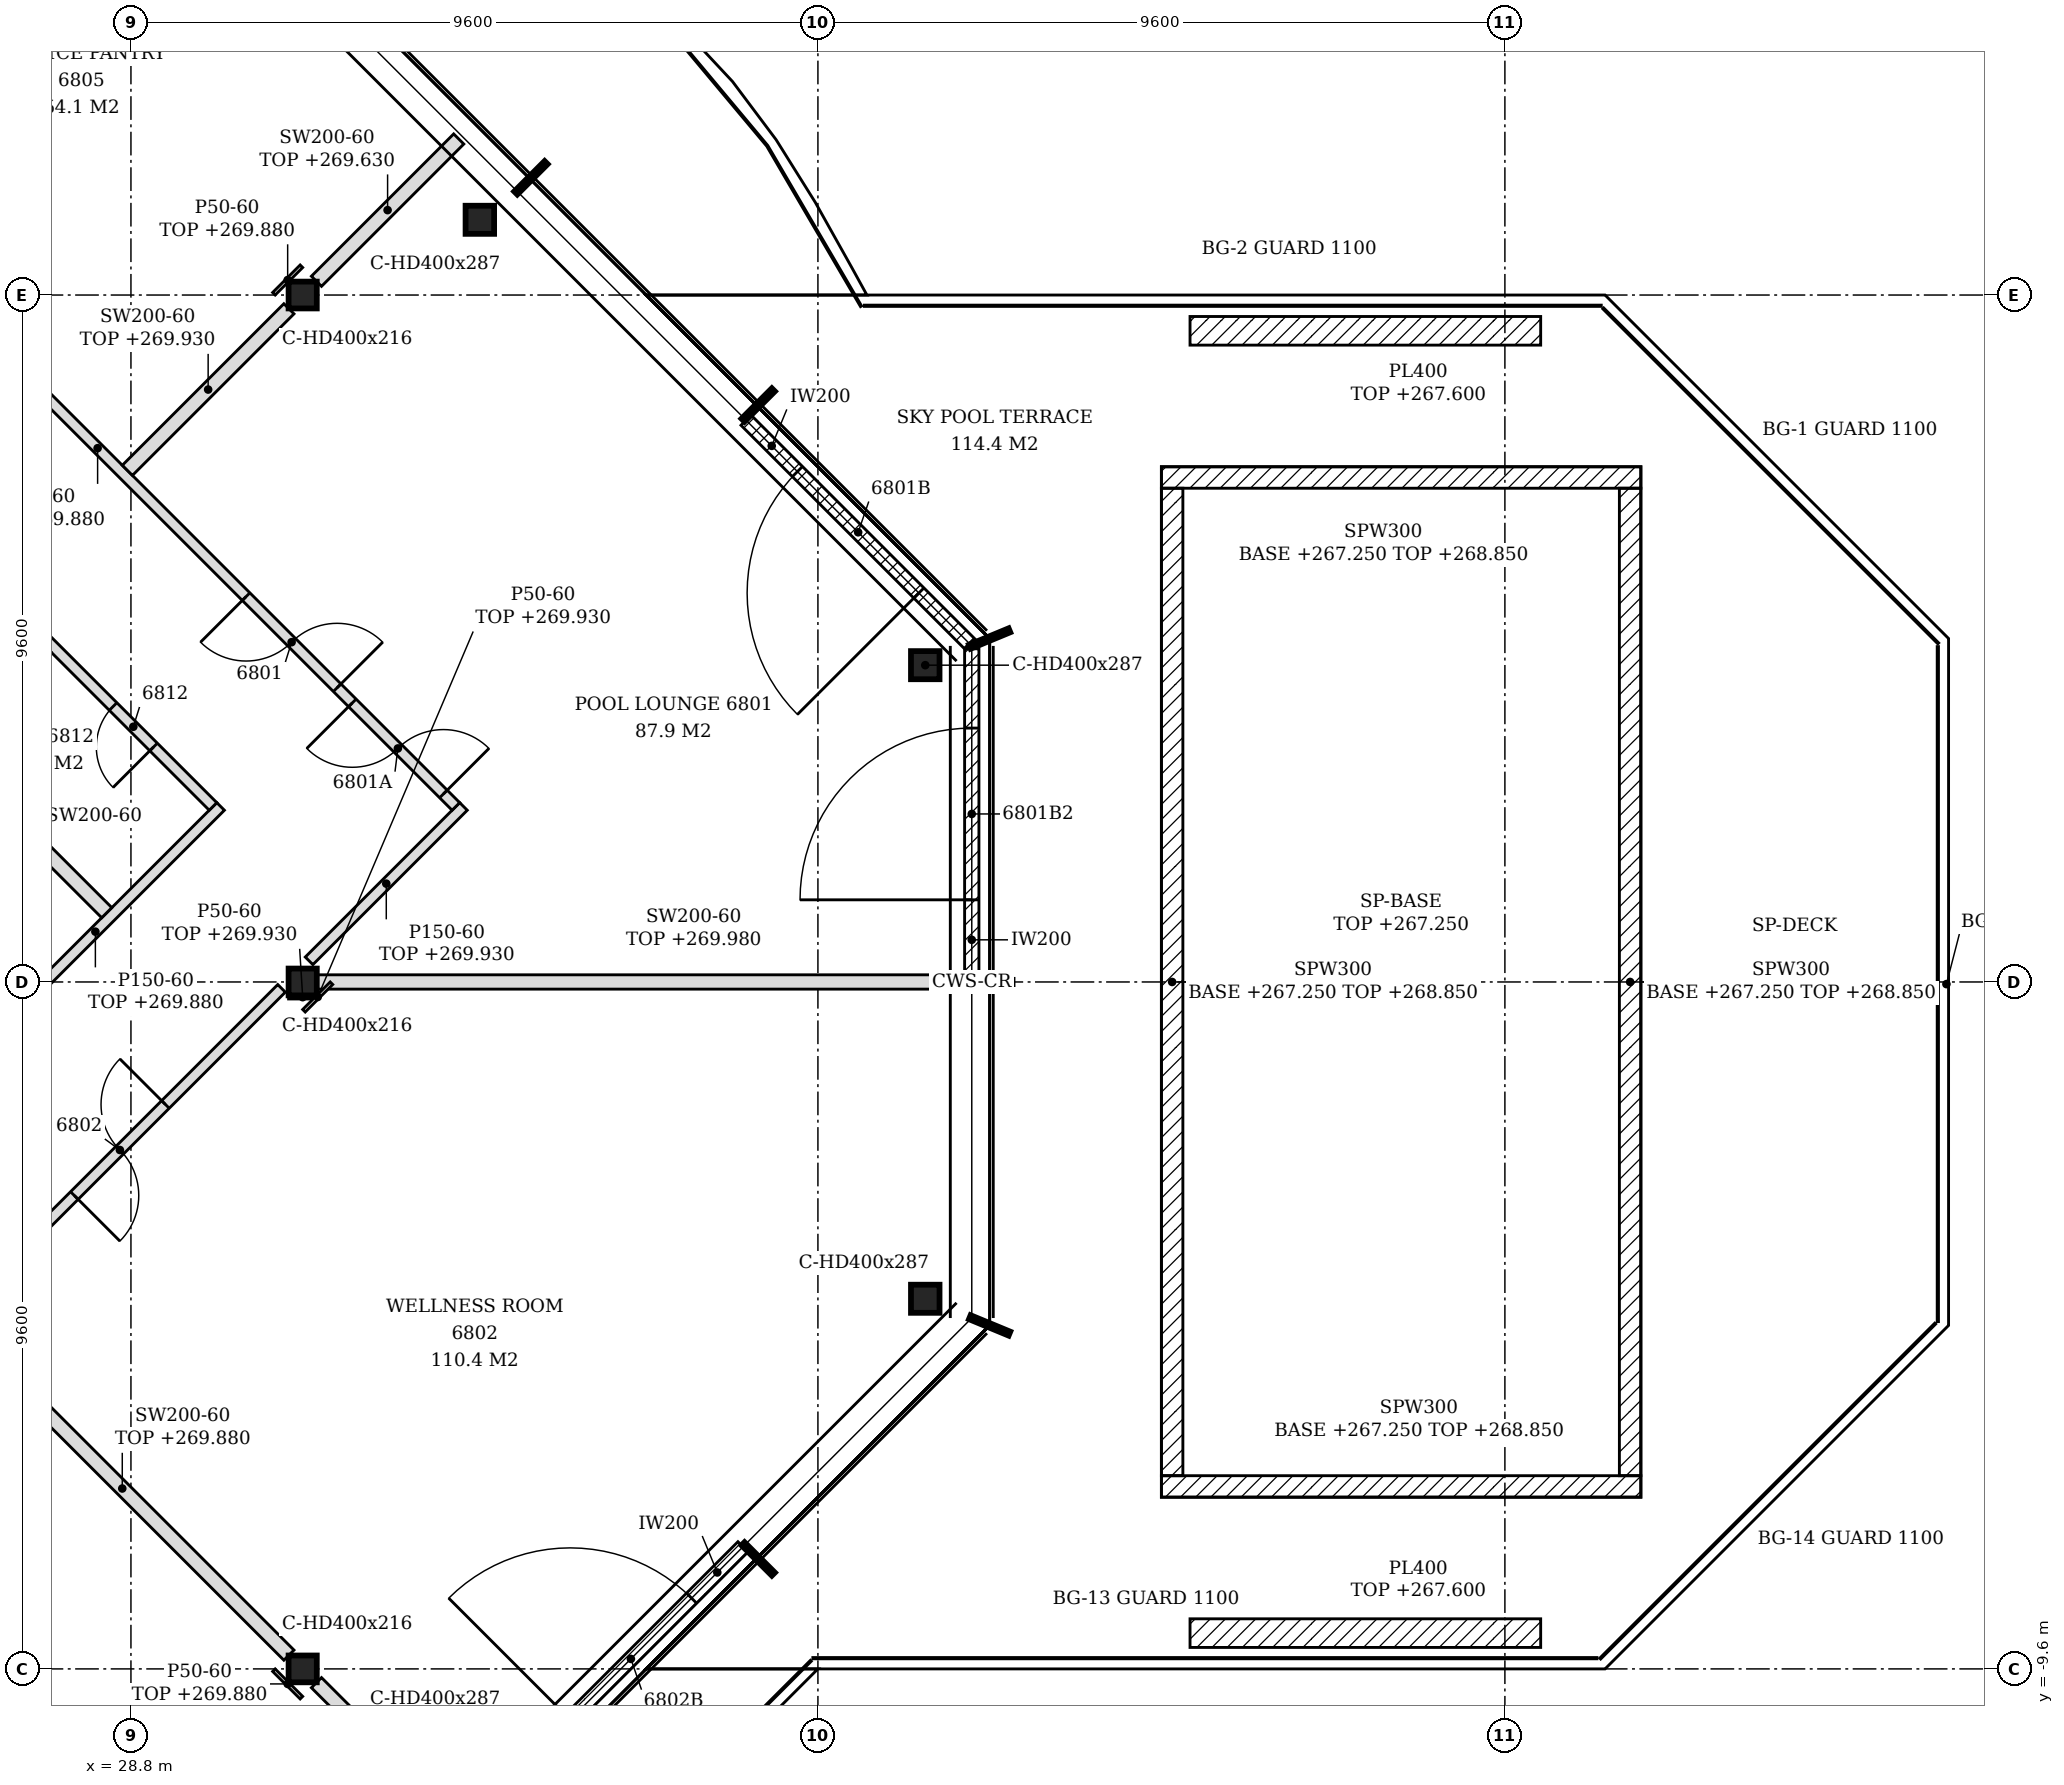
"""IFC4 building model, lengths in metres.
Left out: names, types, materials, properties, quantities, classifications, styles, units other than length and angle.
Written with IfcOpenShell. Run it as: python <this file> out.ifc"""

import sys

from ifc_helpers import new_model, si_unit, direction, frame, frame_2d, origin, origin_2d, place, context, subcontext, project, spatial, polyline, rectangle, i_section, outline, extrude, element, fill, save


model = new_model("IFC4")
c1 = context("Model", 3, precision=1e-05, world=origin(), true_north=direction((0.0, 1.0)))
c2 = subcontext(c1, "Body", "Model", "MODEL_VIEW")
j1 = project(units=[si_unit("LENGTHUNIT", "METRE"), si_unit("PLANEANGLEUNIT", "RADIAN")], contexts=[c1])
p1 = place(None, origin())
s1 = spatial("IfcSite", under=j1, at=p1, CompositionType="ELEMENT")
p2 = place(p1, origin())
s2 = spatial("IfcBuilding", under=s1, at=p2, CompositionType="ELEMENT")
p3 = place(p2, frame((0.0, 0.0, 267.0)))
s3 = spatial("IfcBuildingStorey", under=s2, at=p3, CompositionType="ELEMENT", Elevation=267.0)
for number, where, z_axis, x_axis in (
    (1, (39.9, -4.427, -0.15), (0.0, 0.0, 1.0), (1.0, 0.0, 0.0)),
    (2, (39.9, 4.427, -0.15), (0.0, 0.0, 1.0), (1.0, 0.0, 0.0)),
    (3, (33.676, 10.652, -0.15), (0.0, 0.0, 1.0), (1.0, 0.0, 0.0)),
):
    element("IfcColumn", number, at=place(p3, frame(where, z_axis=z_axis, x_axis=x_axis)), inside=s3, PredefinedType="COLUMN", context=c2, shape_type="SweptSolid", body=[
        extrude(i_section(OverallWidth=0.399, OverallDepth=0.393, WebThickness=0.023, FlangeThickness=0.037, FilletRadius=0.015, at=origin_2d()), origin(), (0.0, 0.0, 1.0), 3.6),
    ])
for number, where, z_axis, x_axis in (
    (4, (31.2, -9.6, -0.15), (0.0, 0.0, 1.0), (1.0, 0.0, 0.0)),
    (5, (31.2, 0.0, -0.15), (0.0, 0.0, 1.0), (1.0, 0.0, 0.0)),
    (6, (31.2, 9.6, -0.15), (0.0, 0.0, 1.0), (1.0, 0.0, 0.0)),
):
    element("IfcColumn", number, at=place(p3, frame(where, z_axis=z_axis, x_axis=x_axis)), inside=s3, PredefinedType="COLUMN", context=c2, shape_type="SweptSolid", body=[
        extrude(i_section(OverallWidth=0.394, OverallDepth=0.375, WebThickness=0.017, FlangeThickness=0.028, FilletRadius=0.015, at=origin_2d()), origin(), (0.0, 0.0, 1.0), 3.6),
    ])
p4 = place(p3, frame((34.22, -11.026, 0.0), z_axis=(0.0, 0.0, 1.0), x_axis=(0.707134329907, 0.707079231393, 0.0)))
e7 = element("IfcWall", 7, at=p4, inside=s3, PredefinedType="NOTDEFINED", context=c2, shape_type="SweptSolid", body=[
    extrude(rectangle(XDim=4.431, YDim=0.2, at=frame_2d((2.215, 0.0))), origin(), (0.0, 0.0, 1.0), 3.45),
])
p5 = place(p4, frame((1.015, 0.0, 0.0)))
e8 = element("IfcOpeningElement", 8, at=p5, cuts=e7, PredefinedType="OPENING", context=c2, shape_type="SweptSolid", body=[
    extrude(rectangle(XDim=2.4, YDim=2.4, at=frame_2d((1.2, 1.2))), frame((0.0, 0.11, 0.0), z_axis=(0.0, -1.0, 0.0), x_axis=(1.0, 0.0, 0.0)), (0.0, 0.0, 1.0), 0.22),
])
p6 = place(p3, frame((40.55, 0.03, 0.0), z_axis=(0.0, 0.0, 1.0), x_axis=(0.0, 1.0, 0.0)))
e9 = element("IfcWall", 9, at=p6, inside=s3, PredefinedType="NOTDEFINED", context=c2, shape_type="SweptSolid", body=[
    extrude(rectangle(XDim=4.626, YDim=0.2, at=frame_2d((2.313, 0.0))), origin(), (0.0, 0.0, 1.0), 3.45),
])
p7 = place(p6, frame((1.118, 0.0, 0.0)))
e10 = element("IfcOpeningElement", 10, at=p7, cuts=e9, PredefinedType="OPENING", context=c2, shape_type="SweptSolid", body=[
    extrude(rectangle(XDim=2.4, YDim=2.4, at=frame_2d((1.2, 1.2))), frame((0.0, 0.11, 0.0), z_axis=(0.0, -1.0, 0.0), x_axis=(1.0, 0.0, 0.0)), (0.0, 0.0, 1.0), 0.22),
])
p8 = place(p3, frame((40.522, 4.725, 0.0), z_axis=(0.0, 0.0, 1.0), x_axis=(-0.707106781187, 0.707106781187, 0.0)))
e11 = element("IfcWall", 11, at=p8, inside=s3, PredefinedType="NOTDEFINED", context=c2, shape_type="SweptSolid", body=[
    extrude(rectangle(XDim=4.421, YDim=0.2, at=frame_2d((2.21, 0.0))), origin(), (0.0, 0.0, 1.0), 3.45),
])
p9 = place(p8, frame((1.005, 0.0, 0.0)))
e12 = element("IfcOpeningElement", 12, at=p9, cuts=e11, PredefinedType="OPENING", context=c2, shape_type="SweptSolid", body=[
    extrude(rectangle(XDim=2.4, YDim=2.4, at=frame_2d((1.2, 1.2))), frame((0.0, 0.11, 0.0), z_axis=(0.0, -1.0, 0.0), x_axis=(1.0, 0.0, 0.0)), (0.0, 0.0, 1.0), 0.22),
])
for number, where, z_axis, x_axis in (
    (13, (43.2, -7.05, 0.25), (0.0, 0.0, 1.0), (1.0, 0.0, 0.0)),
    (14, (43.2, 7.05, 0.25), (0.0, 0.0, 1.0), (1.0, 0.0, 0.0)),
):
    element("IfcWall", number, at=place(p3, frame(where, z_axis=z_axis, x_axis=x_axis)), inside=s3, PredefinedType="NOTDEFINED", context=c2, shape_type="SweptSolid", body=[
        extrude(rectangle(XDim=6.7, YDim=0.3, at=frame_2d((3.35, 0.0))), origin(), (0.0, 0.0, 1.0), 1.6),
    ])
for number, where, z_axis, x_axis in (
    (15, (43.35, -6.9, 0.25), (0.0, 0.0, 1.0), (0.0, 1.0, 0.0)),
    (16, (49.75, -6.9, 0.25), (0.0, 0.0, 1.0), (0.0, 1.0, 0.0)),
):
    element("IfcWall", number, at=place(p3, frame(where, z_axis=z_axis, x_axis=x_axis)), inside=s3, PredefinedType="NOTDEFINED", context=c2, shape_type="SweptSolid", body=[
        extrude(rectangle(XDim=13.8, YDim=0.3, at=frame_2d((6.9, 0.0))), origin(), (0.0, 0.0, 1.0), 1.6),
    ])
for number, where, z_axis, x_axis in (
    (17, (43.6, -9.1, 0.0), (0.0, 0.0, 1.0), (1.0, 0.0, 0.0)),
    (18, (43.6, 9.1, 0.0), (0.0, 0.0, 1.0), (1.0, 0.0, 0.0)),
):
    element("IfcWall", number, at=place(p3, frame(where, z_axis=z_axis, x_axis=x_axis)), inside=s3, PredefinedType="NOTDEFINED", context=c2, shape_type="SweptSolid", body=[
        extrude(rectangle(XDim=4.9, YDim=0.4, at=frame_2d((2.45, 0.0))), origin(), (0.0, 0.0, 1.0), 0.6),
    ])
p10 = place(p3, frame((14.322, -16.672, 0.0), z_axis=(0.0, 0.0, 1.0), x_axis=(0.707106781187, 0.707106781187, 0.0)))
e19 = element("IfcWall", 19, at=p10, inside=s3, PredefinedType="PARTITIONING", context=c2, shape_type="SweptSolid", body=[
    extrude(rectangle(XDim=23.452, YDim=0.15, at=frame_2d((11.726, 0.0))), origin(), (0.0, 0.0, 1.0), 2.73),
])
p11 = place(p10, frame((19.357, 0.0, 0.0)))
e20 = element("IfcOpeningElement", 20, at=p11, cuts=e19, PredefinedType="OPENING", context=c2, shape_type="SweptSolid", body=[
    extrude(rectangle(XDim=1.8, YDim=2.1, at=frame_2d((0.9, 1.05))), frame((0.0, 0.085, 0.0), z_axis=(0.0, -1.0, 0.0), x_axis=(1.0, 0.0, 0.0)), (0.0, 0.0, 1.0), 0.17),
])
p12 = place(p10, frame((2.975, 0.0, 0.0)))
e21 = element("IfcOpeningElement", 21, at=p12, cuts=e19, PredefinedType="OPENING", context=c2, shape_type="SweptSolid", body=[
    extrude(rectangle(XDim=0.9, YDim=2.1, at=frame_2d((0.45, 1.05))), frame((0.0, 0.085, 0.0), z_axis=(0.0, -1.0, 0.0), x_axis=(1.0, 0.0, 0.0)), (0.0, 0.0, 1.0), 0.17),
])
p13 = place(p10, frame((12.587, 0.0, 0.0)))
e22 = element("IfcOpeningElement", 22, at=p13, cuts=e19, PredefinedType="OPENING", context=c2, shape_type="SweptSolid", body=[
    extrude(rectangle(XDim=0.9, YDim=2.1, at=frame_2d((0.45, 1.05))), frame((0.0, 0.085, 0.0), z_axis=(0.0, -1.0, 0.0), x_axis=(1.0, 0.0, 0.0)), (0.0, 0.0, 1.0), 0.17),
])
p14 = place(p3, frame((33.381, -11.781, 0.0), z_axis=(0.0, 0.0, 1.0), x_axis=(-0.707106781187, 0.707106781187, 0.0)))
e23 = element("IfcWall", 23, at=p14, inside=s3, PredefinedType="PARTITIONING", context=c2, shape_type="SweptSolid", body=[
    extrude(rectangle(XDim=2.812, YDim=0.2, at=frame_2d((1.406, 0.0))), origin(), (0.0, 0.0, 1.0), 2.63),
])
p15 = place(p3, frame((31.008, -9.408, 0.0), z_axis=(0.0, 0.0, 1.0), x_axis=(-0.707106781187, 0.707106781187, 0.0)))
e24 = element("IfcWall", 24, at=p15, inside=s3, PredefinedType="PARTITIONING", context=c2, shape_type="SweptSolid", body=[
    extrude(rectangle(XDim=6.587, YDim=0.2, at=frame_2d((3.293, 0.0))), origin(), (0.0, 0.0, 1.0), 2.88),
])
p16 = place(p3, frame((26.553, -1.047, 0.0), z_axis=(0.0, 0.0, 1.0), x_axis=(0.707106781187, 0.707106781187, 0.0)))
e25 = element("IfcWall", 25, at=p16, inside=s3, PredefinedType="PARTITIONING", context=c2, shape_type="SweptSolid", body=[
    extrude(rectangle(XDim=4.95, YDim=0.15, at=frame_2d((2.475, 0.0))), origin(), (0.0, 0.0, 1.0), 2.88),
])
p17 = place(p3, frame((31.397, 0.0, 0.0), z_axis=(0.0, 0.0, 1.0), x_axis=(1.0, 0.0, 0.0)))
e26 = element("IfcWall", 26, at=p17, inside=s3, PredefinedType="PARTITIONING", context=c2, shape_type="SweptSolid", body=[
    extrude(outline(polyline([(0.0, 0.0), (9.053, 0.0), (9.053, 2.98), (8.653, 2.98), (8.651, 2.93), (8.353, 2.93), (8.351, 2.98), (0.0, 2.98), (0.0, 0.0)])), frame((0.0, 0.1, 0.0), z_axis=(0.0, -1.0, 0.0), x_axis=(1.0, 0.0, 0.0)), (0.0, 0.0, 1.0), 0.2),
])
p18 = place(p3, frame((31.289, 0.295, 0.0), z_axis=(0.0, 0.0, 1.0), x_axis=(0.707146786096, 0.707066774014, 0.0)))
e27 = element("IfcWall", 27, at=p18, inside=s3, PredefinedType="PARTITIONING", context=c2, shape_type="SweptSolid", body=[
    extrude(rectangle(XDim=3.051, YDim=0.15, at=frame_2d((1.526, 0.0))), origin(), (0.0, 0.0, 1.0), 2.93),
])
p19 = place(p3, frame((28.462, 0.968, 0.0), z_axis=(0.0, 0.0, 1.0), x_axis=(-0.707106781187, 0.707106781187, 0.0)))
e28 = element("IfcWall", 28, at=p19, inside=s3, PredefinedType="PARTITIONING", context=c2, shape_type="SweptSolid", body=[
    extrude(rectangle(XDim=3.124, YDim=0.2, at=frame_2d((1.562, 0.0))), origin(), (0.0, 0.0, 1.0), 3.45),
])
p20 = place(p3, frame((29.947, 2.453, 0.0), z_axis=(0.0, 0.0, 1.0), x_axis=(-0.707098603185, 0.707114959093, 0.0)))
e29 = element("IfcWall", 29, at=p20, inside=s3, PredefinedType="PARTITIONING", context=c2, shape_type="SweptSolid", body=[
    extrude(rectangle(XDim=14.927, YDim=0.15, at=frame_2d((7.463, 0.0))), origin(), (0.0, 0.0, 1.0), 2.88),
])
p21 = place(p20, frame((1.175, 0.0, 0.0)))
e30 = element("IfcOpeningElement", 30, at=p21, cuts=e29, PredefinedType="OPENING", context=c2, shape_type="SweptSolid", body=[
    extrude(rectangle(XDim=0.8, YDim=2.1, at=frame_2d((0.4, 1.05))), frame((0.0, 0.085, 0.0), z_axis=(0.0, -1.0, 0.0), x_axis=(1.0, 0.0, 0.0)), (0.0, 0.0, 1.0), 0.17),
])
p22 = place(p3, frame((33.341, 2.453, 0.0), z_axis=(0.0, 0.0, 1.0), x_axis=(-0.707098652635, 0.707114909645, 0.0)))
e31 = element("IfcWall", 31, at=p22, inside=s3, PredefinedType="PARTITIONING", context=c2, shape_type="SweptSolid", body=[
    extrude(rectangle(XDim=15.018, YDim=0.15, at=frame_2d((7.509, 0.0))), origin(), (0.0, 0.0, 1.0), 2.88),
])
p23 = place(p22, frame((2.347, 0.0, 0.0)))
e32 = element("IfcOpeningElement", 32, at=p23, cuts=e31, PredefinedType="OPENING", context=c2, shape_type="SweptSolid", body=[
    extrude(rectangle(XDim=1.8, YDim=2.1, at=frame_2d((0.9, 1.05))), frame((0.0, 0.085, 0.0), z_axis=(0.0, -1.0, 0.0), x_axis=(1.0, 0.0, 0.0)), (0.0, 0.0, 1.0), 0.17),
])
p24 = place(p22, frame((0.247, 0.0, 0.0)))
e33 = element("IfcOpeningElement", 33, at=p24, cuts=e31, PredefinedType="OPENING", context=c2, shape_type="SweptSolid", body=[
    extrude(rectangle(XDim=1.8, YDim=2.1, at=frame_2d((0.9, 1.05))), frame((0.0, 0.085, 0.0), z_axis=(0.0, -1.0, 0.0), x_axis=(1.0, 0.0, 0.0)), (0.0, 0.0, 1.0), 0.17),
])
p25 = place(p22, frame((10.015, 0.0, 0.0)))
e34 = element("IfcOpeningElement", 34, at=p25, cuts=e31, PredefinedType="OPENING", context=c2, shape_type="SweptSolid", body=[
    extrude(rectangle(XDim=0.9, YDim=2.1, at=frame_2d((0.45, 1.05))), frame((0.0, 0.085, 0.0), z_axis=(0.0, -1.0, 0.0), x_axis=(1.0, 0.0, 0.0)), (0.0, 0.0, 1.0), 0.17),
])
p26 = place(p3, frame((28.75, 7.15, 0.0), z_axis=(0.0, 0.0, 1.0), x_axis=(0.707106781187, 0.707106781187, 0.0)))
e35 = element("IfcWall", 35, at=p26, inside=s3, PredefinedType="PARTITIONING", context=c2, shape_type="SweptSolid", body=[
    extrude(rectangle(XDim=3.193, YDim=0.2, at=frame_2d((1.597, 0.0))), origin(), (0.0, 0.0, 1.0), 2.93),
])
p27 = place(p3, frame((31.392, 9.792, 0.0), z_axis=(0.0, 0.0, 1.0), x_axis=(0.707106781187, 0.707106781187, 0.0)))
e36 = element("IfcWall", 36, at=p27, inside=s3, PredefinedType="PARTITIONING", context=c2, shape_type="SweptSolid", body=[
    extrude(rectangle(XDim=2.812, YDim=0.2, at=frame_2d((1.406, 0.0))), origin(), (0.0, 0.0, 1.0), 2.63),
])
p28 = place(p3, frame((31.218, -0.402, 0.0), z_axis=(0.0, 0.0, 1.0), x_axis=(0.707106781187, 0.707106781187, 0.0)))
e37 = element("IfcWall", 37, at=p28, inside=s3, PredefinedType="PARTITIONING", context=c2, shape_type="SweptSolid", body=[
    extrude(rectangle(XDim=0.544, YDim=0.05, at=frame_2d((0.272, 0.0))), origin(), (0.0, 0.0, 1.0), 2.93),
])
p29 = place(p3, frame((31.182, -10.002, 0.0), z_axis=(0.0, 0.0, 1.0), x_axis=(-0.707106781187, 0.707106781187, 0.0)))
e38 = element("IfcWall", 38, at=p29, inside=s3, PredefinedType="PARTITIONING", context=c2, shape_type="SweptSolid", body=[
    extrude(rectangle(XDim=0.544, YDim=0.05, at=frame_2d((0.272, 0.0))), origin(), (0.0, 0.0, 1.0), 2.88),
])
p30 = place(p3, frame((31.003, -0.212, 0.0), z_axis=(0.0, 0.0, 1.0), x_axis=(1.0, 0.0, 0.0)))
e39 = element("IfcWall", 39, at=p30, inside=s3, PredefinedType="PARTITIONING", context=c2, shape_type="SweptSolid", body=[
    extrude(rectangle(XDim=0.394, YDim=0.05, at=frame_2d((0.197, 0.0))), origin(), (0.0, 0.0, 1.0), 2.93),
])
p31 = place(p3, frame((30.798, 9.618, 0.0), z_axis=(0.0, 0.0, 1.0), x_axis=(0.707106781187, 0.707106781187, 0.0)))
e40 = element("IfcWall", 40, at=p31, inside=s3, PredefinedType="PARTITIONING", context=c2, shape_type="SweptSolid", body=[
    extrude(rectangle(XDim=0.544, YDim=0.05, at=frame_2d((0.272, 0.0))), origin(), (0.0, 0.0, 1.0), 2.88),
])
p32 = place(p5, origin())
e41 = element("IfcDoor", 41, at=p32, inside=s3, OperationType="SINGLE_SWING_LEFT", PredefinedType="DOOR", context=c2, shape_type="SweptSolid", body=[
    extrude(rectangle(XDim=2.4, YDim=2.4, at=frame_2d((1.2, 1.2))), frame((0.0, 0.025, 0.0), z_axis=(0.0, -1.0, 0.0), x_axis=(1.0, 0.0, 0.0)), (0.0, 0.0, 1.0), 0.05),
])
fill(e8, e41)
p33 = place(p7, origin())
e42 = element("IfcDoor", 42, at=p33, inside=s3, OperationType="SINGLE_SWING_LEFT", PredefinedType="DOOR", context=c2, shape_type="SweptSolid", body=[
    extrude(rectangle(XDim=2.4, YDim=2.4, at=frame_2d((1.2, 1.2))), frame((0.0, 0.025, 0.0), z_axis=(0.0, -1.0, 0.0), x_axis=(1.0, 0.0, 0.0)), (0.0, 0.0, 1.0), 0.05),
])
fill(e10, e42)
p34 = place(p9, origin())
e43 = element("IfcDoor", 43, at=p34, inside=s3, OperationType="SINGLE_SWING_LEFT", PredefinedType="DOOR", context=c2, shape_type="SweptSolid", body=[
    extrude(rectangle(XDim=2.4, YDim=2.4, at=frame_2d((1.2, 1.2))), frame((0.0, 0.025, 0.0), z_axis=(0.0, -1.0, 0.0), x_axis=(1.0, 0.0, 0.0)), (0.0, 0.0, 1.0), 0.05),
])
fill(e12, e43)
p35 = place(p23, frame((1.8, 0.0, 0.0), z_axis=(0.0, 0.0, 1.0), x_axis=(-1.0, 0.0, 0.0)))
e44 = element("IfcDoor", 44, at=p35, inside=s3, OperationType="DOUBLE_DOOR_SINGLE_SWING", PredefinedType="DOOR", context=c2, shape_type="SweptSolid", body=[
    extrude(rectangle(XDim=1.8, YDim=2.1, at=frame_2d((0.9, 1.05))), frame((0.0, 0.025, 0.0), z_axis=(0.0, -1.0, 0.0), x_axis=(1.0, 0.0, 0.0)), (0.0, 0.0, 1.0), 0.05),
])
fill(e32, e44)
p36 = place(p24, frame((1.8, 0.0, 0.0), z_axis=(0.0, 0.0, 1.0), x_axis=(-1.0, 0.0, 0.0)))
e45 = element("IfcDoor", 45, at=p36, inside=s3, OperationType="DOUBLE_DOOR_SINGLE_SWING", PredefinedType="DOOR", context=c2, shape_type="SweptSolid", body=[
    extrude(rectangle(XDim=1.8, YDim=2.1, at=frame_2d((0.9, 1.05))), frame((0.0, 0.025, 0.0), z_axis=(0.0, -1.0, 0.0), x_axis=(1.0, 0.0, 0.0)), (0.0, 0.0, 1.0), 0.05),
])
fill(e33, e45)
p37 = place(p11, frame((1.8, 0.0, 0.0), z_axis=(0.0, 0.0, 1.0), x_axis=(-1.0, 0.0, 0.0)))
e46 = element("IfcDoor", 46, at=p37, inside=s3, OperationType="DOUBLE_DOOR_SINGLE_SWING", PredefinedType="DOOR", context=c2, shape_type="SweptSolid", body=[
    extrude(rectangle(XDim=1.8, YDim=2.1, at=frame_2d((0.9, 1.05))), frame((0.0, 0.025, 0.0), z_axis=(0.0, -1.0, 0.0), x_axis=(1.0, 0.0, 0.0)), (0.0, 0.0, 1.0), 0.05),
])
fill(e20, e46)
p38 = place(p21, origin())
e47 = element("IfcDoor", 47, at=p38, inside=s3, OperationType="SINGLE_SWING_LEFT", PredefinedType="DOOR", context=c2, shape_type="SweptSolid", body=[
    extrude(rectangle(XDim=0.8, YDim=2.1, at=frame_2d((0.4, 1.05))), frame((0.0, 0.025, 0.0), z_axis=(0.0, -1.0, 0.0), x_axis=(1.0, 0.0, 0.0)), (0.0, 0.0, 1.0), 0.05),
])
fill(e30, e47)
save(model, sys.argv[1])
